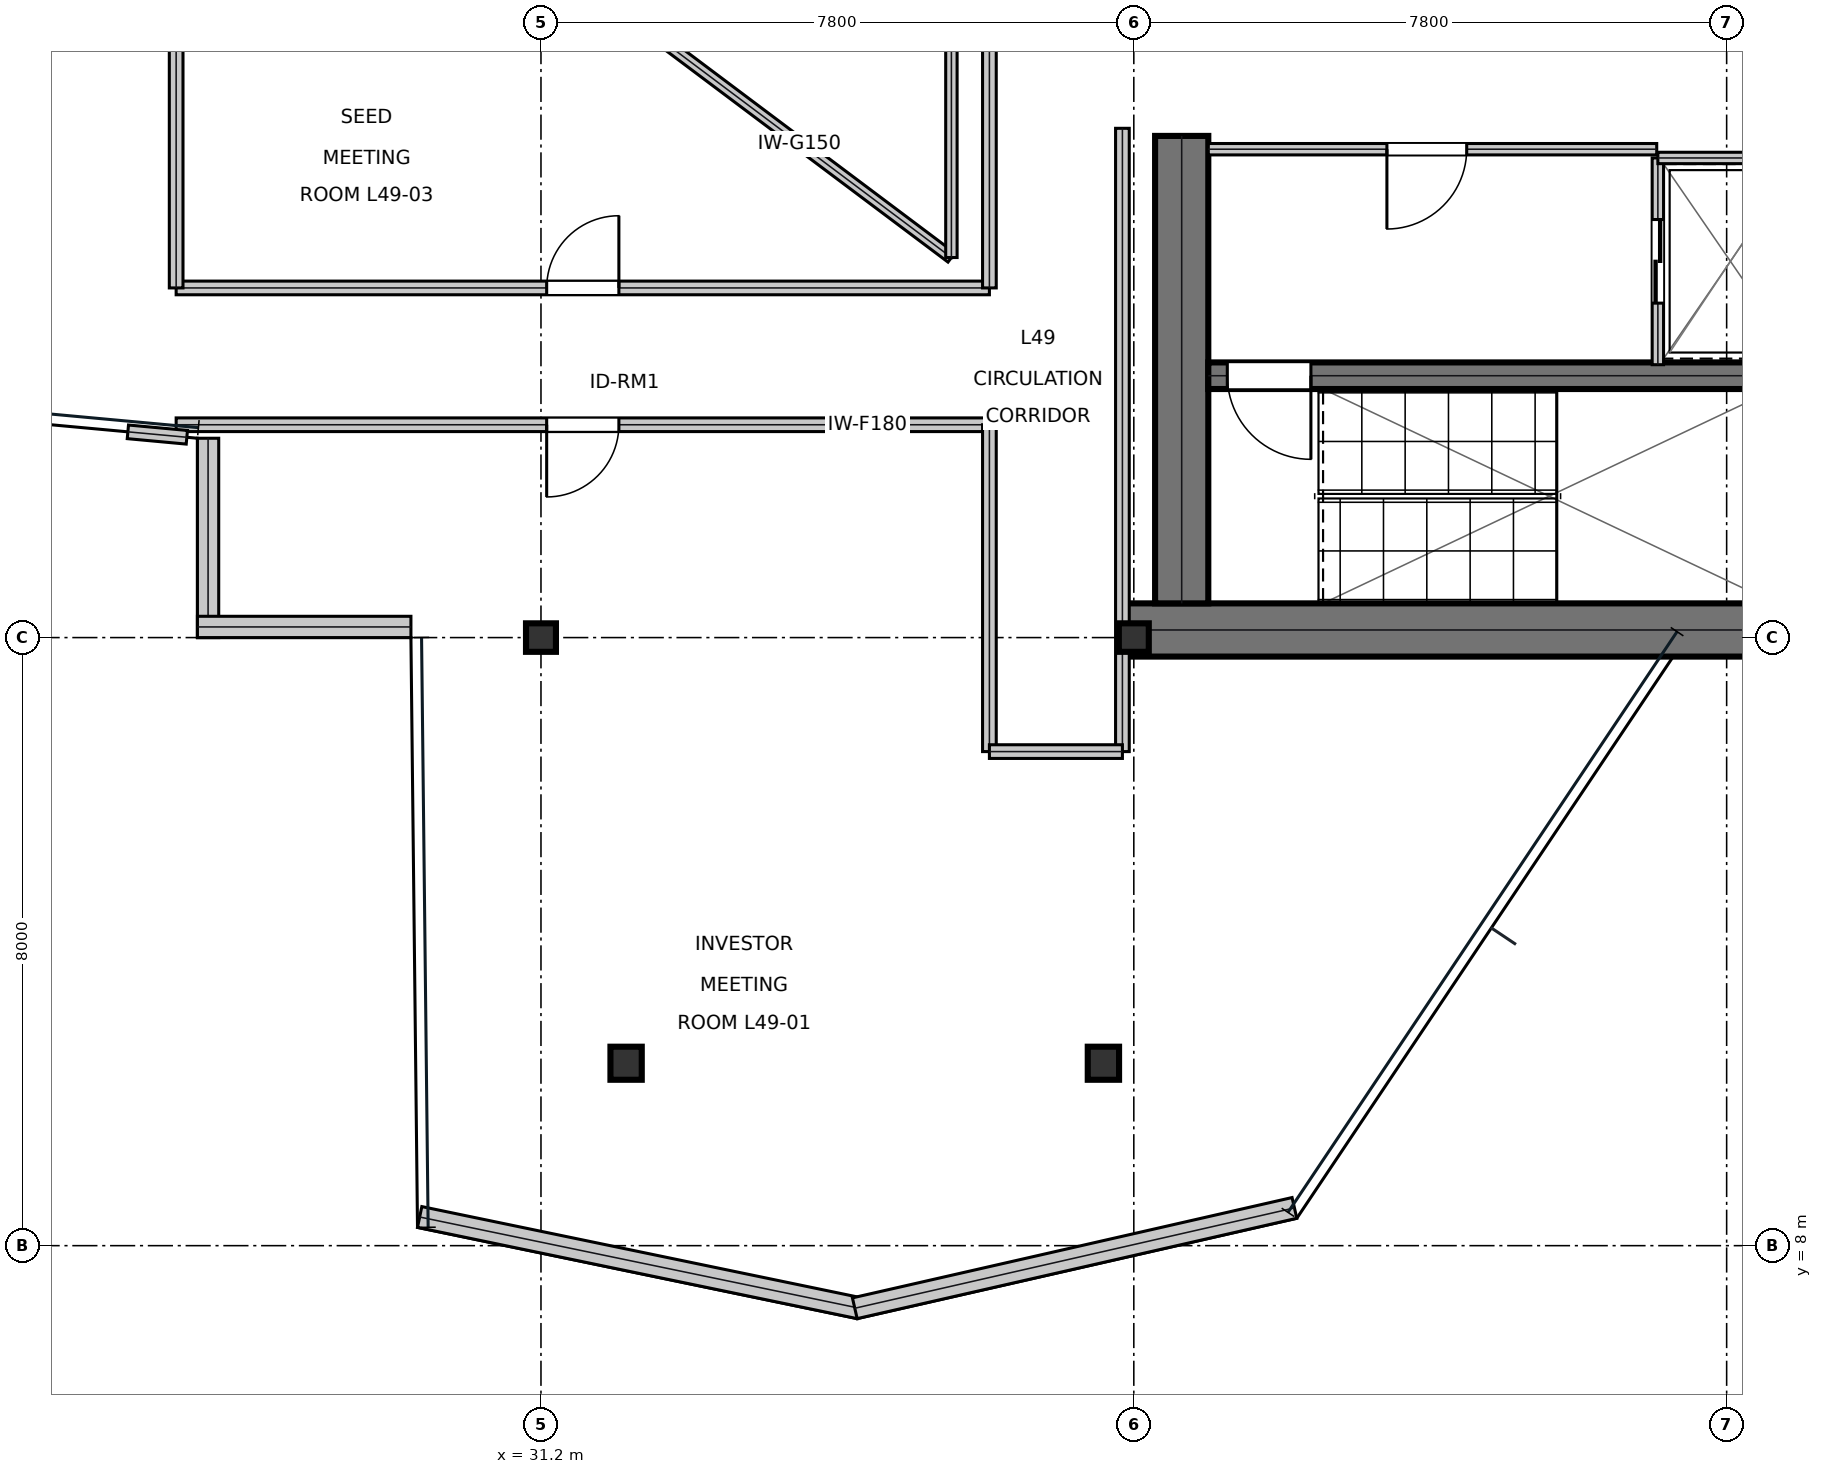
"""IFC4 building model, lengths in metres.
Left out: names, types, materials, properties, quantities, classifications, styles, units other than length and angle.
Written with IfcOpenShell. Run it as: python <this file> out.ifc"""

import sys

from ifc_helpers import new_model, si_unit, direction, frame, frame_2d, origin, origin_2d, place, context, subcontext, project, spatial, rectangle, i_section, extrude, element, fill, save


model = new_model("IFC4")
c1 = context("Model", 3, precision=1e-05, world=origin(), true_north=direction((0.0, 1.0)))
c2 = subcontext(c1, "Body", "Model", "MODEL_VIEW")
j1 = project(units=[si_unit("LENGTHUNIT", "METRE"), si_unit("PLANEANGLEUNIT", "RADIAN")], contexts=[c1])
p1 = place(None, origin())
s1 = spatial("IfcSite", under=j1, at=p1, CompositionType="ELEMENT")
p2 = place(p1, origin())
s2 = spatial("IfcBuilding", under=s1, at=p2, CompositionType="ELEMENT")
p3 = place(p2, frame((0.0, 0.0, 212.1)))
s3 = spatial("IfcBuildingStorey", under=s2, at=p3, CompositionType="ELEMENT", Elevation=212.1)
p4 = place(p3, frame((38.8, 16.1, 0.0), z_axis=(0.0, 0.0, 1.0), x_axis=(1.0, 0.0, 0.0)))
e1 = element("IfcWall", 1, at=p4, inside=s3, PredefinedType="SHEAR", context=c2, shape_type="SweptSolid", body=[
    extrude(rectangle(XDim=16.0, YDim=0.7, at=frame_2d((8.0, 0.0))), origin(), (0.0, 0.0, 1.0), 3.79),
])
p5 = place(p3, frame((39.63, 16.45, 0.0), z_axis=(0.0, 0.0, 1.0), x_axis=(0.0, 1.0, 0.0)))
e2 = element("IfcWall", 2, at=p5, inside=s3, PredefinedType="SHEAR", context=c2, shape_type="SweptSolid", body=[
    extrude(rectangle(XDim=6.15, YDim=0.7, at=frame_2d((3.075, 0.0))), origin(), (0.0, 0.0, 1.0), 3.79),
])
p6 = place(p3, frame((39.98, 19.445, 0.0), z_axis=(0.0, 0.0, 1.0), x_axis=(1.0, 0.0, 0.0)))
e3 = element("IfcWall", 3, at=p6, inside=s3, PredefinedType="SHEAR", context=c2, shape_type="SweptSolid", body=[
    extrude(rectangle(XDim=7.71, YDim=0.35, at=frame_2d((3.855, 0.0))), origin(), (0.0, 0.0, 1.0), 3.79),
])
p7 = place(p6, frame((0.25, 0.0, 0.0)))
e4 = element("IfcOpeningElement", 4, at=p7, cuts=e3, PredefinedType="OPENING", context=c2, shape_type="SweptSolid", body=[
    extrude(rectangle(XDim=1.1, YDim=2.15, at=frame_2d((0.55, 1.075))), frame((0.0, 0.185, 0.0), z_axis=(0.0, -1.0, 0.0), x_axis=(1.0, 0.0, 0.0)), (0.0, 0.0, 1.0), 0.37),
])
for number, where, z_axis, x_axis in (
    (5, (31.2, 16.0, 0.0), (0.0, 0.0, 1.0), (1.0, 0.0, 0.0)),
    (6, (39.0, 16.0, 0.0), (0.0, 0.0, 1.0), (1.0, 0.0, 0.0)),
):
    element("IfcColumn", number, at=place(p3, frame(where, z_axis=z_axis, x_axis=x_axis)), inside=s3, PredefinedType="COLUMN", context=c2, shape_type="SweptSolid", body=[
        extrude(i_section(OverallWidth=0.394, OverallDepth=0.375, WebThickness=0.017, FlangeThickness=0.028, at=origin_2d()), origin(), (0.0, 0.0, 1.0), 4.044),
    ])
p8 = place(p3, frame((32.32, 10.4, 0.016), z_axis=(0.017362829439, 0.037336154213, 0.999151912245), x_axis=(-0.906747333095, 0.421674369537, 0.0)))
e7 = element("IfcColumn", 7, at=p8, inside=s3, PredefinedType="COLUMN", context=c2, shape_type="SweptSolid", body=[
    extrude(i_section(OverallWidth=0.412, OverallDepth=0.435, WebThickness=0.036, FlangeThickness=0.058, at=origin_2d()), origin(), (0.0, 0.0, 1.0), 4.021),
])
p9 = place(p3, frame((38.6, 10.4, 0.016), z_axis=(-0.006253867425, 0.037341053069, 0.999283010412), x_axis=(-0.986263587143, -0.165179104839, 0.0)))
e8 = element("IfcColumn", 8, at=p9, inside=s3, PredefinedType="COLUMN", context=c2, shape_type="SweptSolid", body=[
    extrude(i_section(OverallWidth=0.412, OverallDepth=0.435, WebThickness=0.036, FlangeThickness=0.058, at=origin_2d()), origin(), (0.0, 0.0, 1.0), 4.021),
])
p10 = place(p3, frame((26.82, 18.622, 0.0), z_axis=(0.0, 0.0, 1.0), x_axis=(0.0, -1.0, 0.0)))
e9 = element("IfcWall", 9, at=p10, inside=s3, PredefinedType="STANDARD", context=c2, shape_type="SweptSolid", body=[
    extrude(rectangle(XDim=2.622, YDim=0.28, at=frame_2d((1.311, 0.0))), origin(), (0.0, 0.0, 1.0), 3.319),
])
p11 = place(p3, frame((26.68, 16.14, 0.0), z_axis=(0.0, 0.0, 1.0), x_axis=(1.0, 0.0, 0.0)))
e10 = element("IfcWall", 10, at=p11, inside=s3, PredefinedType="STANDARD", context=c2, shape_type="SweptSolid", body=[
    extrude(rectangle(XDim=2.809, YDim=0.28, at=frame_2d((1.405, 0.0))), origin(), (0.0, 0.0, 1.0), 3.79),
])
p12 = place(p3, frame((29.604, 8.377, 0.0), z_axis=(0.0, 0.0, 1.0), x_axis=(0.979145472124, -0.203160390873, 0.0)))
e11 = element("IfcWall", 11, at=p12, inside=s3, PredefinedType="STANDARD", context=c2, shape_type="SweptSolid", body=[
    extrude(rectangle(XDim=5.908, YDim=0.28, at=frame_2d((2.954, 0.0))), origin(), (0.0, 0.0, 1.0), 3.79),
])
p13 = place(p3, frame((35.329, 7.177, 0.0), z_axis=(0.0, 0.0, 1.0), x_axis=(0.974934808954, 0.222490715064, 0.0)))
e12 = element("IfcWall", 12, at=p13, inside=s3, PredefinedType="STANDARD", context=c2, shape_type="SweptSolid", body=[
    extrude(rectangle(XDim=5.933, YDim=0.28, at=frame_2d((2.967, 0.0))), origin(), (0.0, 0.0, 1.0), 3.79),
])
p14 = place(p3, frame((39.98, 22.425, 0.0), z_axis=(0.0, 0.0, 1.0), x_axis=(1.0, 0.0, 0.0)))
e13 = element("IfcWall", 13, at=p14, inside=s3, PredefinedType="PARTITIONING", context=c2, shape_type="SweptSolid", body=[
    extrude(rectangle(XDim=5.9, YDim=0.15, at=frame_2d((2.95, 0.0))), origin(), (0.0, 0.0, 1.0), 3.79),
])
p15 = place(p14, frame((2.35, 0.0, 0.0)))
e14 = element("IfcOpeningElement", 14, at=p15, cuts=e13, PredefinedType="OPENING", context=c2, shape_type="SweptSolid", body=[
    extrude(rectangle(XDim=1.05, YDim=2.15, at=frame_2d((0.525, 1.075))), frame((0.0, 0.085, 0.0), z_axis=(0.0, -1.0, 0.0), x_axis=(1.0, 0.0, 0.0)), (0.0, 0.0, 1.0), 0.17),
])
p16 = place(p3, frame((45.895, 19.59, 0.0), z_axis=(0.0, 0.0, 1.0), x_axis=(0.0, 1.0, 0.0)))
e15 = element("IfcWall", 15, at=p16, inside=s3, PredefinedType="PARTITIONING", context=c2, shape_type="SweptSolid", body=[
    extrude(rectangle(XDim=2.72, YDim=0.15, at=frame_2d((1.36, 0.0))), origin(), (0.0, 0.0, 1.0), 3.79),
])
p17 = place(p16, frame((0.81, 0.0, 0.0)))
e16 = element("IfcOpeningElement", 16, at=p17, cuts=e15, PredefinedType="OPENING", context=c2, shape_type="SweptSolid", body=[
    extrude(rectangle(XDim=1.1, YDim=2.15, at=frame_2d((0.55, 1.075))), frame((0.0, 0.085, 0.0), z_axis=(0.0, -1.0, 0.0), x_axis=(1.0, 0.0, 0.0)), (0.0, 0.0, 1.0), 0.17),
])
p18 = place(p3, frame((45.895, 22.31, 0.0), z_axis=(0.0, 0.0, 1.0), x_axis=(1.0, 0.0, 0.0)))
e17 = element("IfcWall", 17, at=p18, inside=s3, PredefinedType="PARTITIONING", context=c2, shape_type="SweptSolid", body=[
    extrude(rectangle(XDim=1.915, YDim=0.15, at=frame_2d((0.958, 0.0))), origin(), (0.0, 0.0, 1.0), 3.79),
])
p19 = place(p3, frame((26.4, 18.8, 0.0), z_axis=(0.0, 0.0, 1.0), x_axis=(1.0, 0.0, 0.0)))
e18 = element("IfcWall", 18, at=p19, inside=s3, PredefinedType="SOLIDWALL", context=c2, shape_type="SweptSolid", body=[
    extrude(rectangle(XDim=10.7, YDim=0.18, at=frame_2d((5.35, 0.0))), origin(), (0.0, 0.0, 1.0), 3.241),
])
p20 = place(p19, frame((4.875, 0.0, 0.0)))
e19 = element("IfcOpeningElement", 19, at=p20, cuts=e18, PredefinedType="OPENING", context=c2, shape_type="SweptSolid", body=[
    extrude(rectangle(XDim=0.95, YDim=2.15, at=frame_2d((0.475, 1.075))), frame((0.0, 0.1, 0.0), z_axis=(0.0, -1.0, 0.0), x_axis=(1.0, 0.0, 0.0)), (0.0, 0.0, 1.0), 0.2),
])
p21 = place(p3, frame((26.4, 20.6, 0.0), z_axis=(0.0, 0.0, 1.0), x_axis=(1.0, 0.0, 0.0)))
e20 = element("IfcWall", 20, at=p21, inside=s3, PredefinedType="SOLIDWALL", context=c2, shape_type="SweptSolid", body=[
    extrude(rectangle(XDim=10.7, YDim=0.18, at=frame_2d((5.35, 0.0))), origin(), (0.0, 0.0, 1.0), 3.241),
])
p22 = place(p21, frame((4.875, 0.0, 0.0)))
e21 = element("IfcOpeningElement", 21, at=p22, cuts=e20, PredefinedType="OPENING", context=c2, shape_type="SweptSolid", body=[
    extrude(rectangle(XDim=0.95, YDim=2.15, at=frame_2d((0.475, 1.075))), frame((0.0, 0.1, 0.0), z_axis=(0.0, -1.0, 0.0), x_axis=(1.0, 0.0, 0.0)), (0.0, 0.0, 1.0), 0.2),
])
p23 = place(p3, frame((38.85, 14.5, 0.0), z_axis=(0.0, 0.0, 1.0), x_axis=(0.0, 1.0, 0.0)))
e22 = element("IfcWall", 22, at=p23, inside=s3, PredefinedType="SOLIDWALL", context=c2, shape_type="SweptSolid", body=[
    extrude(rectangle(XDim=8.2, YDim=0.18, at=frame_2d((4.1, 0.0))), origin(), (0.0, 0.0, 1.0), 3.241),
])
p24 = place(p3, frame((37.1, 14.5, 0.0), z_axis=(0.0, 0.0, 1.0), x_axis=(0.0, 1.0, 0.0)))
e23 = element("IfcWall", 23, at=p24, inside=s3, PredefinedType="SOLIDWALL", context=c2, shape_type="SweptSolid", body=[
    extrude(rectangle(XDim=4.3, YDim=0.18, at=frame_2d((2.15, 0.0))), origin(), (0.0, 0.0, 1.0), 3.241),
])
p25 = place(p3, frame((37.1, 14.5, 0.0), z_axis=(0.0, 0.0, 1.0), x_axis=(1.0, 0.0, 0.0)))
e24 = element("IfcWall", 24, at=p25, inside=s3, PredefinedType="SOLIDWALL", context=c2, shape_type="SweptSolid", body=[
    extrude(rectangle(XDim=1.75, YDim=0.18, at=frame_2d((0.875, 0.0))), origin(), (0.0, 0.0, 1.0), 3.241),
])
p26 = place(p3, frame((25.765, 18.707, 0.0), z_axis=(0.0, 0.0, 1.0), x_axis=(0.995774178655, -0.091835641909, 0.0)))
e25 = element("IfcWall", 25, at=p26, inside=s3, PredefinedType="SOLIDWALL", context=c2, shape_type="SweptSolid", body=[
    extrude(rectangle(XDim=0.779, YDim=0.18, at=frame_2d((0.389, 0.0))), origin(), (0.0, 0.0, 1.0), 3.79),
])
p27 = place(p3, frame((26.4, 20.6, 0.0), z_axis=(0.0, 0.0, 1.0), x_axis=(0.0, 1.0, 0.0)))
e26 = element("IfcWall", 26, at=p27, inside=s3, PredefinedType="SOLIDWALL", context=c2, shape_type="SweptSolid", body=[
    extrude(rectangle(XDim=4.078, YDim=0.18, at=frame_2d((2.039, 0.0))), origin(), (0.0, 0.0, 1.0), 3.241),
])
p28 = place(p3, frame((37.1, 20.6, 0.0), z_axis=(0.0, 0.0, 1.0), x_axis=(0.0, 1.0, 0.0)))
e27 = element("IfcWall", 27, at=p28, inside=s3, PredefinedType="SOLIDWALL", context=c2, shape_type="SweptSolid", body=[
    extrude(rectangle(XDim=4.078, YDim=0.18, at=frame_2d((2.039, 0.0))), origin(), (0.0, 0.0, 1.0), 3.79),
])
p29 = place(p3, frame((32.6, 24.0, 0.0), z_axis=(0.0, 0.0, 1.0), x_axis=(0.8, -0.6, 0.0)))
e28 = element("IfcWall", 28, at=p29, inside=s3, PredefinedType="MOVABLE", context=c2, shape_type="SweptSolid", body=[
    extrude(rectangle(XDim=5.0, YDim=0.15, at=frame_2d((2.5, 0.0))), origin(), (0.0, 0.0, 1.0), 3.79),
])
p30 = place(p3, frame((36.6, 21.0, 0.0), z_axis=(0.0, 0.0, 1.0), x_axis=(0.0, 1.0, 0.0)))
e29 = element("IfcWall", 29, at=p30, inside=s3, PredefinedType="MOVABLE", context=c2, shape_type="SweptSolid", body=[
    extrude(rectangle(XDim=6.0, YDim=0.15, at=frame_2d((3.0, 0.0))), origin(), (0.0, 0.0, 1.0), 3.79),
])
p31 = place(p15, frame((1.05, 0.0, 0.0), z_axis=(0.0, 0.0, 1.0), x_axis=(-1.0, 0.0, 0.0)))
e30 = element("IfcDoor", 30, at=p31, inside=s3, OperationType="SINGLE_SWING_RIGHT", PredefinedType="DOOR", context=c2, shape_type="SweptSolid", body=[
    extrude(rectangle(XDim=1.05, YDim=2.15, at=frame_2d((0.525, 1.075))), frame((0.0, 0.025, 0.0), z_axis=(0.0, -1.0, 0.0), x_axis=(1.0, 0.0, 0.0)), (0.0, 0.0, 1.0), 0.05),
])
fill(e14, e30)
p32 = place(p17, frame((1.1, 0.0, 0.0), z_axis=(0.0, 0.0, 1.0), x_axis=(-1.0, 0.0, 0.0)))
e31 = element("IfcDoor", 31, at=p32, inside=s3, OperationType="DOUBLE_DOOR_SLIDING", PredefinedType="DOOR", context=c2, shape_type="SweptSolid", body=[
    extrude(rectangle(XDim=1.1, YDim=2.15, at=frame_2d((0.55, 1.075))), frame((0.0, 0.025, 0.0), z_axis=(0.0, -1.0, 0.0), x_axis=(1.0, 0.0, 0.0)), (0.0, 0.0, 1.0), 0.05),
])
fill(e16, e31)
p33 = place(p20, frame((0.95, 0.0, 0.0), z_axis=(0.0, 0.0, 1.0), x_axis=(-1.0, 0.0, 0.0)))
e32 = element("IfcDoor", 32, at=p33, inside=s3, OperationType="SINGLE_SWING_RIGHT", PredefinedType="DOOR", context=c2, shape_type="SweptSolid", body=[
    extrude(rectangle(XDim=0.95, YDim=2.15, at=frame_2d((0.475, 1.075))), frame((0.0, 0.025, 0.0), z_axis=(0.0, -1.0, 0.0), x_axis=(1.0, 0.0, 0.0)), (0.0, 0.0, 1.0), 0.05),
])
fill(e19, e32)
p34 = place(p22, origin())
e33 = element("IfcDoor", 33, at=p34, inside=s3, OperationType="SINGLE_SWING_RIGHT", PredefinedType="DOOR", context=c2, shape_type="SweptSolid", body=[
    extrude(rectangle(XDim=0.95, YDim=2.15, at=frame_2d((0.475, 1.075))), frame((0.0, 0.025, 0.0), z_axis=(0.0, -1.0, 0.0), x_axis=(1.0, 0.0, 0.0)), (0.0, 0.0, 1.0), 0.05),
])
fill(e21, e33)
p35 = place(p7, frame((1.1, 0.0, 0.0), z_axis=(0.0, 0.0, 1.0), x_axis=(-1.0, 0.0, 0.0)))
e34 = element("IfcDoor", 34, at=p35, inside=s3, OperationType="SINGLE_SWING_LEFT", PredefinedType="DOOR", context=c2, shape_type="SweptSolid", body=[
    extrude(rectangle(XDim=1.1, YDim=2.15, at=frame_2d((0.55, 1.075))), frame((0.0, 0.025, 0.0), z_axis=(0.0, -1.0, 0.0), x_axis=(1.0, 0.0, 0.0)), (0.0, 0.0, 1.0), 0.05),
])
fill(e4, e34)
save(model, sys.argv[1])
